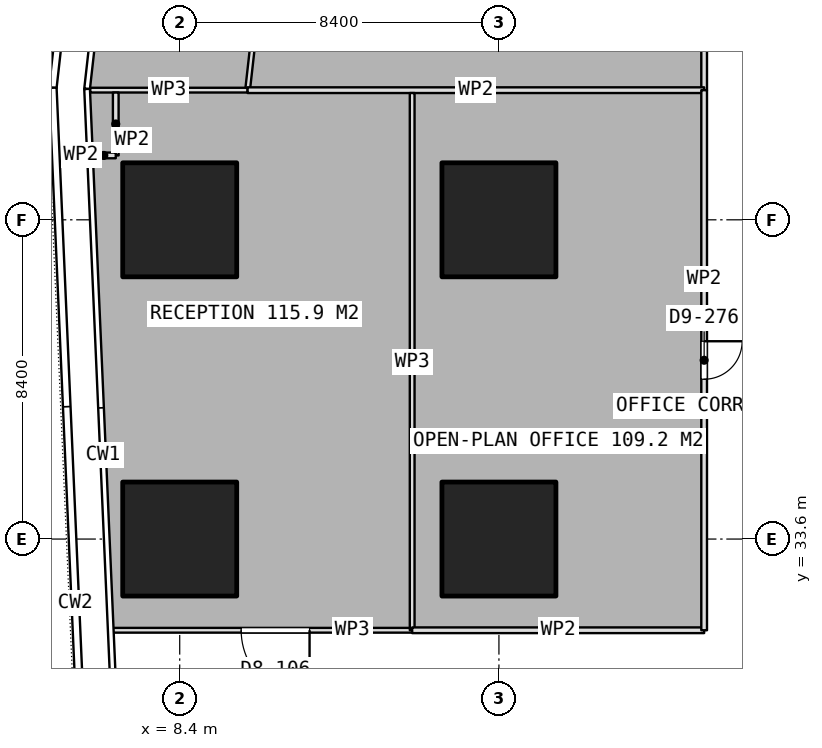
"""IFC4 building model, lengths in metres.
Left out: names, types, materials, properties, quantities, classifications, styles, units other than length and angle.
Written with IfcOpenShell. Run it as: python <this file> out.ifc"""

import sys

from ifc_helpers import new_model, si_unit, direction, frame, frame_2d, origin, origin_2d, place, context, subcontext, project, spatial, rectangle, extrude, element, fill, save


model = new_model("IFC4")
c1 = context("Model", 3, precision=1e-05, world=origin(), true_north=direction((0.0, 1.0)))
c2 = subcontext(c1, "Body", "Model", "MODEL_VIEW")
j1 = project(units=[si_unit("LENGTHUNIT", "METRE"), si_unit("PLANEANGLEUNIT", "RADIAN")], contexts=[c1])
p1 = place(None, origin())
s1 = spatial("IfcSite", under=j1, at=p1, CompositionType="ELEMENT")
p2 = place(p1, origin())
s2 = spatial("IfcBuilding", under=s1, at=p2, CompositionType="ELEMENT")
p3 = place(p2, frame((0.0, 0.0, 77.9)))
s3 = spatial("IfcBuildingStorey", under=s2, at=p3, CompositionType="ELEMENT", Elevation=77.9)
for number, where, z_axis, x_axis in (
    (1, (8.4, 33.6, 0.0), (0.0, 0.0, 1.0), (1.0, 0.0, 0.0)),
    (2, (8.4, 42.0, 0.0), (0.0, 0.0, 1.0), (1.0, 0.0, 0.0)),
    (3, (16.8, 33.6, 0.0), (0.0, 0.0, 1.0), (1.0, 0.0, 0.0)),
    (4, (16.8, 42.0, 0.0), (0.0, 0.0, 1.0), (1.0, 0.0, 0.0)),
):
    element("IfcColumn", number, at=place(p3, frame(where, z_axis=z_axis, x_axis=x_axis)), inside=s3, PredefinedType="COLUMN", context=c2, shape_type="SweptSolid", body=[
        extrude(rectangle(XDim=3.0, YDim=3.0, at=origin_2d()), origin(), (0.0, 0.0, 1.0), 3.75),
    ])
p4 = place(p3, frame((10.928, 52.012, 0.0), z_axis=(0.0, 0.0, 1.0), x_axis=(-0.111714457102, -0.993740348418, 0.0)))
e5 = element("IfcWall", 5, at=p4, inside=s3, PredefinedType="PARTITIONING", context=c2, shape_type="SweptSolid", body=[
    extrude(rectangle(XDim=6.641, YDim=0.125, at=frame_2d((3.321, 0.0))), origin(), (0.0, 0.0, 1.0), 3.5),
])
p5 = place(p4, frame((3.321, 0.0, 0.0)))
e6 = element("IfcOpeningElement", 6, at=p5, cuts=e5, PredefinedType="OPENING", context=c2, shape_type="SweptSolid", body=[
    extrude(rectangle(XDim=1.0, YDim=2.1, at=frame_2d((0.5, 1.05))), frame((0.0, 0.073, 0.0), z_axis=(0.0, -1.0, 0.0), x_axis=(1.0, 0.0, 0.0)), (0.0, 0.0, 1.0), 0.145),
])
p6 = place(p3, frame((10.186, 45.412, 0.0), z_axis=(0.0, 0.0, 1.0), x_axis=(-1.0, 0.0, 0.0)))
e7 = element("IfcWall", 7, at=p6, inside=s3, PredefinedType="PARTITIONING", context=c2, shape_type="SweptSolid", body=[
    extrude(rectangle(XDim=4.142, YDim=0.125, at=frame_2d((2.071, 0.0))), origin(), (0.0, 0.0, 1.0), 3.5),
])
p7 = place(p3, frame((22.2, 53.4, 0.0), z_axis=(0.0, 0.0, 1.0), x_axis=(0.0, -1.0, 0.0)))
e8 = element("IfcWall", 8, at=p7, inside=s3, PredefinedType="PARTITIONING", context=c2, shape_type="SweptSolid", body=[
    extrude(rectangle(XDim=7.989, YDim=0.15, at=frame_2d((3.995, 0.0))), origin(), (0.0, 0.0, 1.0), 3.5),
])
p8 = place(p7, frame((3.494, 0.0, 0.0)))
e9 = element("IfcOpeningElement", 9, at=p8, cuts=e8, PredefinedType="OPENING", context=c2, shape_type="SweptSolid", body=[
    extrude(rectangle(XDim=1.0, YDim=2.1, at=frame_2d((0.5, 1.05))), frame((0.0, 0.085, 0.0), z_axis=(0.0, -1.0, 0.0), x_axis=(1.0, 0.0, 0.0)), (0.0, 0.0, 1.0), 0.17),
])
p9 = place(p3, frame((22.2, 45.411, 0.0), z_axis=(0.0, 0.0, 1.0), x_axis=(-1.0, 0.0, 0.0)))
e10 = element("IfcWall", 10, at=p9, inside=s3, PredefinedType="PARTITIONING", context=c2, shape_type="SweptSolid", body=[
    extrude(rectangle(XDim=12.014, YDim=0.15, at=frame_2d((6.007, 0.0))), origin(), (0.0, 0.0, 1.0), 3.5),
])
p10 = place(p3, frame((6.717, 45.349, 0.0), z_axis=(0.0, 0.0, 1.0), x_axis=(0.0, -1.0, 0.0)))
e11 = element("IfcWall", 11, at=p10, inside=s3, PredefinedType="PARTITIONING", context=c2, shape_type="SweptSolid", body=[
    extrude(rectangle(XDim=1.655, YDim=0.15, at=frame_2d((0.828, 0.0))), origin(), (0.0, 0.0, 1.0), 3.5),
])
p11 = place(p3, frame((6.717, 43.694, 0.0), z_axis=(0.0, 0.0, 1.0), x_axis=(-1.0, 0.0, 0.0)))
e12 = element("IfcWall", 12, at=p11, inside=s3, PredefinedType="PARTITIONING", context=c2, shape_type="SweptSolid", body=[
    extrude(rectangle(XDim=0.628, YDim=0.15, at=frame_2d((0.314, 0.0))), origin(), (0.0, 0.0, 1.0), 3.5),
])
p12 = place(p3, frame((14.517, 31.2, 0.0), z_axis=(0.0, 0.0, 1.0), x_axis=(-1.0, 0.0, 0.0)))
e13 = element("IfcWall", 13, at=p12, inside=s3, PredefinedType="PARTITIONING", context=c2, shape_type="SweptSolid", body=[
    extrude(rectangle(XDim=7.882, YDim=0.125, at=frame_2d((3.941, 0.0))), origin(), (0.0, 0.0, 1.0), 3.5),
])
p13 = place(p12, frame((2.7, 0.0, 0.0)))
e14 = element("IfcOpeningElement", 14, at=p13, cuts=e13, PredefinedType="OPENING", context=c2, shape_type="SweptSolid", body=[
    extrude(rectangle(XDim=1.8, YDim=2.1, at=frame_2d((0.9, 1.05))), frame((0.0, 0.073, 0.0), z_axis=(0.0, -1.0, 0.0), x_axis=(1.0, 0.0, 0.0)), (0.0, 0.0, 1.0), 0.145),
])
p14 = place(p3, frame((14.517, 45.336, 0.0), z_axis=(0.0, 0.0, 1.0), x_axis=(0.0, -1.0, 0.0)))
e15 = element("IfcWall", 15, at=p14, inside=s3, PredefinedType="PARTITIONING", context=c2, shape_type="SweptSolid", body=[
    extrude(rectangle(XDim=14.136, YDim=0.125, at=frame_2d((7.068, 0.0))), origin(), (0.0, 0.0, 1.0), 3.5),
])
p15 = place(p3, frame((22.2, 31.2, 0.0), z_axis=(0.0, 0.0, 1.0), x_axis=(-1.0, 0.0, 0.0)))
e16 = element("IfcWall", 16, at=p15, inside=s3, PredefinedType="PARTITIONING", context=c2, shape_type="SweptSolid", body=[
    extrude(rectangle(XDim=7.683, YDim=0.15, at=frame_2d((3.841, 0.0))), origin(), (0.0, 0.0, 1.0), 3.5),
])
p16 = place(p3, frame((22.2, 45.411, 0.0), z_axis=(0.0, 0.0, 1.0), x_axis=(0.0, -1.0, 0.0)))
e17 = element("IfcWall", 17, at=p16, inside=s3, PredefinedType="PARTITIONING", context=c2, shape_type="SweptSolid", body=[
    extrude(rectangle(XDim=14.211, YDim=0.15, at=frame_2d((7.105, 0.0))), origin(), (0.0, 0.0, 1.0), 3.5),
])
p17 = place(p16, frame((6.606, 0.0, 0.0)))
e18 = element("IfcOpeningElement", 18, at=p17, cuts=e17, PredefinedType="OPENING", context=c2, shape_type="SweptSolid", body=[
    extrude(rectangle(XDim=1.0, YDim=2.1, at=frame_2d((0.5, 1.05))), frame((0.0, 0.085, 0.0), z_axis=(0.0, -1.0, 0.0), x_axis=(1.0, 0.0, 0.0)), (0.0, 0.0, 1.0), 0.17),
])
p18 = place(p13, origin())
e19 = element("IfcDoor", 19, at=p18, inside=s3, OperationType="DOUBLE_DOOR_SINGLE_SWING", PredefinedType="DOOR", context=c2, shape_type="SweptSolid", body=[
    extrude(rectangle(XDim=1.8, YDim=2.1, at=frame_2d((0.9, 1.05))), frame((0.0, 0.025, 0.0), z_axis=(0.0, -1.0, 0.0), x_axis=(1.0, 0.0, 0.0)), (0.0, 0.0, 1.0), 0.05),
])
fill(e14, e19)
p19 = place(p17, origin())
e20 = element("IfcDoor", 20, at=p19, inside=s3, OperationType="SINGLE_SWING_LEFT", PredefinedType="DOOR", context=c2, shape_type="SweptSolid", body=[
    extrude(rectangle(XDim=1.0, YDim=2.1, at=frame_2d((0.5, 1.05))), frame((0.0, 0.025, 0.0), z_axis=(0.0, -1.0, 0.0), x_axis=(1.0, 0.0, 0.0)), (0.0, 0.0, 1.0), 0.05),
])
fill(e18, e20)
save(model, sys.argv[1])
